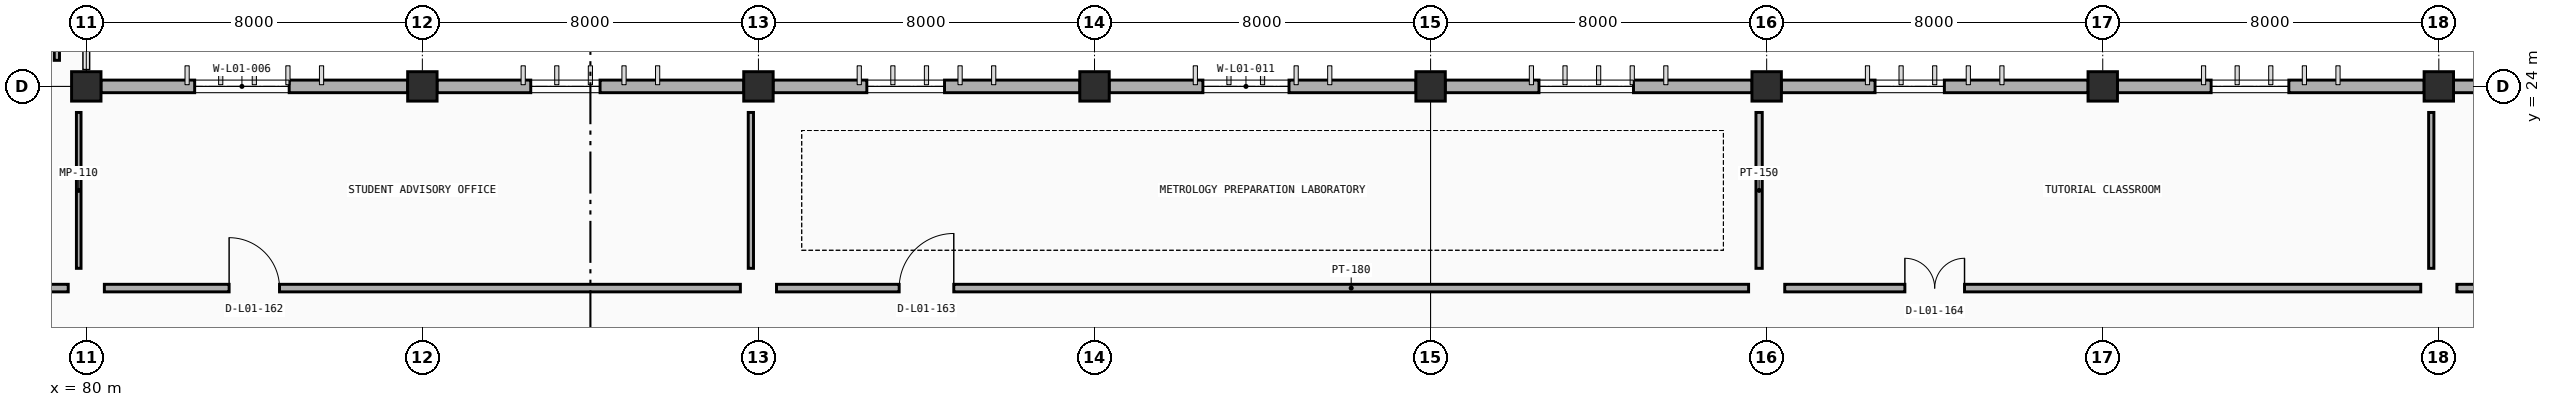
"""IFC4 building model, lengths in metres.
Left out: names, types, materials, properties, quantities, classifications, styles, units other than length and angle.
Written with IfcOpenShell. Run it as: python <this file> out.ifc"""

import sys

from ifc_helpers import new_model, si_unit, direction, frame, frame_2d, origin, origin_2d, place, context, subcontext, project, spatial, rectangle, extrude, element, fill, save


model = new_model("IFC4")
c1 = context("Model", 3, precision=1e-05, world=origin(), true_north=direction((0.0, 1.0)))
c2 = subcontext(c1, "Body", "Model", "MODEL_VIEW")
j1 = project(units=[si_unit("LENGTHUNIT", "METRE"), si_unit("PLANEANGLEUNIT", "RADIAN")], contexts=[c1])
p1 = place(None, origin())
s1 = spatial("IfcSite", under=j1, at=p1, CompositionType="ELEMENT")
p2 = place(p1, origin())
s2 = spatial("IfcBuilding", under=s1, at=p2, CompositionType="ELEMENT")
p3 = place(p2, origin())
s3 = spatial("IfcBuildingStorey", under=s2, at=p3, CompositionType="ELEMENT", Elevation=0.0)
for number, where, z_axis, x_axis in (
    (1, (80.0, 24.0, 0.0), (0.0, 0.0, 1.0), (1.0, 0.0, 0.0)),
    (2, (88.0, 24.0, 0.0), (0.0, 0.0, 1.0), (1.0, 0.0, 0.0)),
    (3, (96.0, 24.0, 0.0), (0.0, 0.0, 1.0), (1.0, 0.0, 0.0)),
    (4, (104.0, 24.0, 0.0), (0.0, 0.0, 1.0), (1.0, 0.0, 0.0)),
    (5, (112.0, 24.0, 0.0), (0.0, 0.0, 1.0), (1.0, 0.0, 0.0)),
    (6, (120.0, 24.0, 0.0), (0.0, 0.0, 1.0), (1.0, 0.0, 0.0)),
    (7, (128.0, 24.0, 0.0), (0.0, 0.0, 1.0), (1.0, 0.0, 0.0)),
    (8, (136.0, 24.0, 0.0), (0.0, 0.0, 1.0), (1.0, 0.0, 0.0)),
):
    element("IfcColumn", number, at=place(p3, frame(where, z_axis=z_axis, x_axis=x_axis)), inside=s3, PredefinedType="COLUMN", context=c2, shape_type="SweptSolid", body=[
        extrude(rectangle(XDim=0.7, YDim=0.7, at=origin_2d()), origin(), (0.0, 0.0, 1.0), 4.8),
    ])
p4 = place(p3, frame((80.347, 24.0, 0.0), z_axis=(0.0, 0.0, 1.0), x_axis=(1.0, 0.0, 0.0)))
e9 = element("IfcWall", 9, at=p4, inside=s3, PredefinedType="STANDARD", context=c2, shape_type="SweptSolid", body=[
    extrude(rectangle(XDim=7.306, YDim=0.3, at=frame_2d((3.653, 0.0))), origin(), (0.0, 0.0, 1.0), 3.91),
])
p5 = place(p4, frame((2.233, 0.0, 0.9)))
e10 = element("IfcOpeningElement", 10, at=p5, cuts=e9, PredefinedType="OPENING", context=c2, shape_type="SweptSolid", body=[
    extrude(rectangle(XDim=2.25, YDim=1.25, at=frame_2d((1.125, 0.625))), frame((0.0, 0.16, 0.0), z_axis=(0.0, -1.0, 0.0), x_axis=(1.0, 0.0, 0.0)), (0.0, 0.0, 1.0), 0.32),
])
p6 = place(p3, frame((88.347, 24.0, 0.0), z_axis=(0.0, 0.0, 1.0), x_axis=(1.0, 0.0, 0.0)))
e11 = element("IfcWall", 11, at=p6, inside=s3, PredefinedType="STANDARD", context=c2, shape_type="SweptSolid", body=[
    extrude(rectangle(XDim=7.306, YDim=0.3, at=frame_2d((3.653, 0.0))), origin(), (0.0, 0.0, 1.0), 3.91),
])
p7 = place(p6, frame((2.233, 0.0, 0.9)))
e12 = element("IfcOpeningElement", 12, at=p7, cuts=e11, PredefinedType="OPENING", context=c2, shape_type="SweptSolid", body=[
    extrude(rectangle(XDim=1.65, YDim=1.25, at=frame_2d((0.825, 0.625))), frame((0.0, 0.16, 0.0), z_axis=(0.0, -1.0, 0.0), x_axis=(1.0, 0.0, 0.0)), (0.0, 0.0, 1.0), 0.32),
])
p8 = place(p3, frame((96.347, 24.0, 0.0), z_axis=(0.0, 0.0, 1.0), x_axis=(1.0, 0.0, 0.0)))
e13 = element("IfcWall", 13, at=p8, inside=s3, PredefinedType="STANDARD", context=c2, shape_type="SweptSolid", body=[
    extrude(rectangle(XDim=7.306, YDim=0.3, at=frame_2d((3.653, 0.0))), origin(), (0.0, 0.0, 1.0), 3.91),
])
p9 = place(p8, frame((2.233, 0.0, 0.9)))
e14 = element("IfcOpeningElement", 14, at=p9, cuts=e13, PredefinedType="OPENING", context=c2, shape_type="SweptSolid", body=[
    extrude(rectangle(XDim=1.85, YDim=1.25, at=frame_2d((0.925, 0.625))), frame((0.0, 0.16, 0.0), z_axis=(0.0, -1.0, 0.0), x_axis=(1.0, 0.0, 0.0)), (0.0, 0.0, 1.0), 0.32),
])
p10 = place(p3, frame((104.347, 24.0, 0.0), z_axis=(0.0, 0.0, 1.0), x_axis=(1.0, 0.0, 0.0)))
e15 = element("IfcWall", 15, at=p10, inside=s3, PredefinedType="STANDARD", context=c2, shape_type="SweptSolid", body=[
    extrude(rectangle(XDim=7.306, YDim=0.3, at=frame_2d((3.653, 0.0))), origin(), (0.0, 0.0, 1.0), 3.91),
])
p11 = place(p10, frame((2.233, 0.0, 0.9)))
e16 = element("IfcOpeningElement", 16, at=p11, cuts=e15, PredefinedType="OPENING", context=c2, shape_type="SweptSolid", body=[
    extrude(rectangle(XDim=2.05, YDim=1.25, at=frame_2d((1.025, 0.625))), frame((0.0, 0.16, 0.0), z_axis=(0.0, -1.0, 0.0), x_axis=(1.0, 0.0, 0.0)), (0.0, 0.0, 1.0), 0.32),
])
p12 = place(p3, frame((112.347, 24.0, 0.0), z_axis=(0.0, 0.0, 1.0), x_axis=(1.0, 0.0, 0.0)))
e17 = element("IfcWall", 17, at=p12, inside=s3, PredefinedType="STANDARD", context=c2, shape_type="SweptSolid", body=[
    extrude(rectangle(XDim=7.306, YDim=0.3, at=frame_2d((3.653, 0.0))), origin(), (0.0, 0.0, 1.0), 3.91),
])
p13 = place(p12, frame((2.233, 0.0, 0.9)))
e18 = element("IfcOpeningElement", 18, at=p13, cuts=e17, PredefinedType="OPENING", context=c2, shape_type="SweptSolid", body=[
    extrude(rectangle(XDim=2.25, YDim=1.25, at=frame_2d((1.125, 0.625))), frame((0.0, 0.16, 0.0), z_axis=(0.0, -1.0, 0.0), x_axis=(1.0, 0.0, 0.0)), (0.0, 0.0, 1.0), 0.32),
])
p14 = place(p3, frame((120.347, 24.0, 0.0), z_axis=(0.0, 0.0, 1.0), x_axis=(1.0, 0.0, 0.0)))
e19 = element("IfcWall", 19, at=p14, inside=s3, PredefinedType="STANDARD", context=c2, shape_type="SweptSolid", body=[
    extrude(rectangle(XDim=7.306, YDim=0.3, at=frame_2d((3.653, 0.0))), origin(), (0.0, 0.0, 1.0), 3.91),
])
p15 = place(p14, frame((2.233, 0.0, 0.9)))
e20 = element("IfcOpeningElement", 20, at=p15, cuts=e19, PredefinedType="OPENING", context=c2, shape_type="SweptSolid", body=[
    extrude(rectangle(XDim=1.65, YDim=1.25, at=frame_2d((0.825, 0.625))), frame((0.0, 0.16, 0.0), z_axis=(0.0, -1.0, 0.0), x_axis=(1.0, 0.0, 0.0)), (0.0, 0.0, 1.0), 0.32),
])
p16 = place(p3, frame((128.347, 24.0, 0.0), z_axis=(0.0, 0.0, 1.0), x_axis=(1.0, 0.0, 0.0)))
e21 = element("IfcWall", 21, at=p16, inside=s3, PredefinedType="STANDARD", context=c2, shape_type="SweptSolid", body=[
    extrude(rectangle(XDim=7.306, YDim=0.3, at=frame_2d((3.653, 0.0))), origin(), (0.0, 0.0, 1.0), 3.91),
])
p17 = place(p16, frame((2.233, 0.0, 0.9)))
e22 = element("IfcOpeningElement", 22, at=p17, cuts=e21, PredefinedType="OPENING", context=c2, shape_type="SweptSolid", body=[
    extrude(rectangle(XDim=1.85, YDim=1.25, at=frame_2d((0.925, 0.625))), frame((0.0, 0.16, 0.0), z_axis=(0.0, -1.0, 0.0), x_axis=(1.0, 0.0, 0.0)), (0.0, 0.0, 1.0), 0.32),
])
p18 = place(p3, frame((136.347, 24.0, 0.0), z_axis=(0.0, 0.0, 1.0), x_axis=(1.0, 0.0, 0.0)))
e23 = element("IfcWall", 23, at=p18, inside=s3, PredefinedType="STANDARD", context=c2, shape_type="SweptSolid", body=[
    extrude(rectangle(XDim=7.306, YDim=0.3, at=frame_2d((3.653, 0.0))), origin(), (0.0, 0.0, 1.0), 3.91),
])
p19 = place(p18, frame((2.233, 0.0, 0.9)))
e24 = element("IfcOpeningElement", 24, at=p19, cuts=e23, PredefinedType="OPENING", context=c2, shape_type="SweptSolid", body=[
    extrude(rectangle(XDim=2.05, YDim=1.25, at=frame_2d((1.025, 0.625))), frame((0.0, 0.16, 0.0), z_axis=(0.0, -1.0, 0.0), x_axis=(1.0, 0.0, 0.0)), (0.0, 0.0, 1.0), 0.32),
])
p20 = place(p3, frame((64.43, 19.2, 0.0), z_axis=(0.0, 0.0, 1.0), x_axis=(1.0, 0.0, 0.0)))
e25 = element("IfcWall", 25, at=p20, inside=s3, PredefinedType="PARTITIONING", context=c2, shape_type="SweptSolid", body=[
    extrude(rectangle(XDim=15.14, YDim=0.18, at=frame_2d((7.57, 0.0))), origin(), (0.0, 0.0, 1.0), 3.9),
])
p21 = place(p20, frame((3.03, 0.0, 0.0)))
e26 = element("IfcOpeningElement", 26, at=p21, cuts=e25, PredefinedType="OPENING", context=c2, shape_type="SweptSolid", body=[
    extrude(rectangle(XDim=1.08, YDim=2.15, at=frame_2d((0.54, 1.075))), frame((0.0, 0.1, 0.0), z_axis=(0.0, -1.0, 0.0), x_axis=(1.0, 0.0, 0.0)), (0.0, 0.0, 1.0), 0.2),
])
p22 = place(p3, frame((79.82, 19.67, 0.0), z_axis=(0.0, 0.0, 1.0), x_axis=(0.0, 1.0, 0.0)))
e27 = element("IfcWall", 27, at=p22, inside=s3, PredefinedType="MOVABLE", context=c2, shape_type="SweptSolid", body=[
    extrude(rectangle(XDim=3.71, YDim=0.11, at=frame_2d((1.855, 0.0))), origin(), (0.0, 0.0, 1.0), 3.76),
])
p23 = place(p3, frame((80.43, 19.2, 0.0), z_axis=(0.0, 0.0, 1.0), x_axis=(1.0, 0.0, 0.0)))
e28 = element("IfcWall", 28, at=p23, inside=s3, PredefinedType="PARTITIONING", context=c2, shape_type="SweptSolid", body=[
    extrude(rectangle(XDim=15.14, YDim=0.18, at=frame_2d((7.57, 0.0))), origin(), (0.0, 0.0, 1.0), 3.9),
])
p24 = place(p23, frame((2.97, 0.0, 0.0)))
e29 = element("IfcOpeningElement", 29, at=p24, cuts=e28, PredefinedType="OPENING", context=c2, shape_type="SweptSolid", body=[
    extrude(rectangle(XDim=1.2, YDim=2.15, at=frame_2d((0.6, 1.075))), frame((0.0, 0.1, 0.0), z_axis=(0.0, -1.0, 0.0), x_axis=(1.0, 0.0, 0.0)), (0.0, 0.0, 1.0), 0.2),
])
p25 = place(p3, frame((95.82, 19.67, 0.0), z_axis=(0.0, 0.0, 1.0), x_axis=(0.0, 1.0, 0.0)))
e30 = element("IfcWall", 30, at=p25, inside=s3, PredefinedType="PARTITIONING", context=c2, shape_type="SweptSolid", body=[
    extrude(rectangle(XDim=3.71, YDim=0.125, at=frame_2d((1.855, 0.0))), origin(), (0.0, 0.0, 1.0), 3.76),
])
p26 = place(p3, frame((96.43, 19.2, 0.0), z_axis=(0.0, 0.0, 1.0), x_axis=(1.0, 0.0, 0.0)))
e31 = element("IfcWall", 31, at=p26, inside=s3, PredefinedType="PARTITIONING", context=c2, shape_type="SweptSolid", body=[
    extrude(rectangle(XDim=23.14, YDim=0.18, at=frame_2d((11.57, 0.0))), origin(), (0.0, 0.0, 1.0), 3.9),
])
p27 = place(p26, frame((2.92, 0.0, 0.0)))
e32 = element("IfcOpeningElement", 32, at=p27, cuts=e31, PredefinedType="OPENING", context=c2, shape_type="SweptSolid", body=[
    extrude(rectangle(XDim=1.3, YDim=2.18, at=frame_2d((0.65, 1.09))), frame((0.0, 0.1, 0.0), z_axis=(0.0, -1.0, 0.0), x_axis=(1.0, 0.0, 0.0)), (0.0, 0.0, 1.0), 0.2),
])
p28 = place(p3, frame((119.82, 19.67, 0.0), z_axis=(0.0, 0.0, 1.0), x_axis=(0.0, 1.0, 0.0)))
e33 = element("IfcWall", 33, at=p28, inside=s3, PredefinedType="PARTITIONING", context=c2, shape_type="SweptSolid", body=[
    extrude(rectangle(XDim=3.71, YDim=0.15, at=frame_2d((1.855, 0.0))), origin(), (0.0, 0.0, 1.0), 3.76),
])
p29 = place(p3, frame((120.43, 19.2, 0.0), z_axis=(0.0, 0.0, 1.0), x_axis=(1.0, 0.0, 0.0)))
e34 = element("IfcWall", 34, at=p29, inside=s3, PredefinedType="PARTITIONING", context=c2, shape_type="SweptSolid", body=[
    extrude(rectangle(XDim=15.14, YDim=0.18, at=frame_2d((7.57, 0.0))), origin(), (0.0, 0.0, 1.0), 3.9),
])
p30 = place(p29, frame((2.86, 0.0, 0.0)))
e35 = element("IfcOpeningElement", 35, at=p30, cuts=e34, PredefinedType="OPENING", context=c2, shape_type="SweptSolid", body=[
    extrude(rectangle(XDim=1.42, YDim=2.2, at=frame_2d((0.71, 1.1))), frame((0.0, 0.1, 0.0), z_axis=(0.0, -1.0, 0.0), x_axis=(1.0, 0.0, 0.0)), (0.0, 0.0, 1.0), 0.2),
])
p31 = place(p3, frame((135.82, 19.67, 0.0), z_axis=(0.0, 0.0, 1.0), x_axis=(0.0, 1.0, 0.0)))
e36 = element("IfcWall", 36, at=p31, inside=s3, PredefinedType="PARTITIONING", context=c2, shape_type="SweptSolid", body=[
    extrude(rectangle(XDim=3.71, YDim=0.125, at=frame_2d((1.855, 0.0))), origin(), (0.0, 0.0, 1.0), 3.76),
])
p32 = place(p3, frame((136.43, 19.2, 0.0), z_axis=(0.0, 0.0, 1.0), x_axis=(1.0, 0.0, 0.0)))
e37 = element("IfcWall", 37, at=p32, inside=s3, PredefinedType="PARTITIONING", context=c2, shape_type="SweptSolid", body=[
    extrude(rectangle(XDim=23.14, YDim=0.18, at=frame_2d((11.57, 0.0))), origin(), (0.0, 0.0, 1.0), 3.9),
])
p33 = place(p32, frame((2.79, 0.0, 0.0)))
e38 = element("IfcOpeningElement", 38, at=p33, cuts=e37, PredefinedType="OPENING", context=c2, shape_type="SweptSolid", body=[
    extrude(rectangle(XDim=1.56, YDim=2.2, at=frame_2d((0.78, 1.1))), frame((0.0, 0.1, 0.0), z_axis=(0.0, -1.0, 0.0), x_axis=(1.0, 0.0, 0.0)), (0.0, 0.0, 1.0), 0.2),
])
p34 = place(p3, frame((79.3, 24.62, 0.0), z_axis=(0.0, 0.0, 1.0), x_axis=(0.0, 1.0, 0.0)))
e39 = element("IfcWall", 39, at=p34, inside=s3, PredefinedType="PARTITIONING", context=c2, shape_type="SweptSolid", body=[
    extrude(rectangle(XDim=6.76, YDim=0.125, at=frame_2d((3.38, 0.0))), origin(), (0.0, 0.0, 1.0), 3.9),
])
p35 = place(p5, origin())
e40 = element("IfcWindow", 40, at=p35, inside=s3, PartitioningType="DOUBLE_PANEL_VERTICAL", PredefinedType="WINDOW", context=c2, shape_type="SweptSolid", body=[
    extrude(rectangle(XDim=2.25, YDim=1.25, at=frame_2d((1.125, 0.625))), frame((0.0, 0.03, 0.0), z_axis=(0.0, -1.0, 0.0), x_axis=(1.0, 0.0, 0.0)), (0.0, 0.0, 1.0), 0.06),
])
fill(e10, e40)
p36 = place(p7, origin())
e41 = element("IfcWindow", 41, at=p36, inside=s3, PartitioningType="DOUBLE_PANEL_VERTICAL", PredefinedType="WINDOW", context=c2, shape_type="SweptSolid", body=[
    extrude(rectangle(XDim=1.65, YDim=1.25, at=frame_2d((0.825, 0.625))), frame((0.0, 0.03, 0.0), z_axis=(0.0, -1.0, 0.0), x_axis=(1.0, 0.0, 0.0)), (0.0, 0.0, 1.0), 0.06),
])
fill(e12, e41)
p37 = place(p9, origin())
e42 = element("IfcWindow", 42, at=p37, inside=s3, PartitioningType="DOUBLE_PANEL_VERTICAL", PredefinedType="WINDOW", context=c2, shape_type="SweptSolid", body=[
    extrude(rectangle(XDim=1.85, YDim=1.25, at=frame_2d((0.925, 0.625))), frame((0.0, 0.03, 0.0), z_axis=(0.0, -1.0, 0.0), x_axis=(1.0, 0.0, 0.0)), (0.0, 0.0, 1.0), 0.06),
])
fill(e14, e42)
p38 = place(p11, origin())
e43 = element("IfcWindow", 43, at=p38, inside=s3, PartitioningType="DOUBLE_PANEL_VERTICAL", PredefinedType="WINDOW", context=c2, shape_type="SweptSolid", body=[
    extrude(rectangle(XDim=2.05, YDim=1.25, at=frame_2d((1.025, 0.625))), frame((0.0, 0.03, 0.0), z_axis=(0.0, -1.0, 0.0), x_axis=(1.0, 0.0, 0.0)), (0.0, 0.0, 1.0), 0.06),
])
fill(e16, e43)
p39 = place(p13, origin())
e44 = element("IfcWindow", 44, at=p39, inside=s3, PartitioningType="DOUBLE_PANEL_VERTICAL", PredefinedType="WINDOW", context=c2, shape_type="SweptSolid", body=[
    extrude(rectangle(XDim=2.25, YDim=1.25, at=frame_2d((1.125, 0.625))), frame((0.0, 0.03, 0.0), z_axis=(0.0, -1.0, 0.0), x_axis=(1.0, 0.0, 0.0)), (0.0, 0.0, 1.0), 0.06),
])
fill(e18, e44)
p40 = place(p15, origin())
e45 = element("IfcWindow", 45, at=p40, inside=s3, PartitioningType="DOUBLE_PANEL_VERTICAL", PredefinedType="WINDOW", context=c2, shape_type="SweptSolid", body=[
    extrude(rectangle(XDim=1.65, YDim=1.25, at=frame_2d((0.825, 0.625))), frame((0.0, 0.03, 0.0), z_axis=(0.0, -1.0, 0.0), x_axis=(1.0, 0.0, 0.0)), (0.0, 0.0, 1.0), 0.06),
])
fill(e20, e45)
p41 = place(p17, origin())
e46 = element("IfcWindow", 46, at=p41, inside=s3, PartitioningType="DOUBLE_PANEL_VERTICAL", PredefinedType="WINDOW", context=c2, shape_type="SweptSolid", body=[
    extrude(rectangle(XDim=1.85, YDim=1.25, at=frame_2d((0.925, 0.625))), frame((0.0, 0.03, 0.0), z_axis=(0.0, -1.0, 0.0), x_axis=(1.0, 0.0, 0.0)), (0.0, 0.0, 1.0), 0.06),
])
fill(e22, e46)
p42 = place(p24, origin())
e47 = element("IfcDoor", 47, at=p42, inside=s3, OperationType="SINGLE_SWING_LEFT", PredefinedType="DOOR", context=c2, shape_type="SweptSolid", body=[
    extrude(rectangle(XDim=1.2, YDim=2.15, at=frame_2d((0.6, 1.075))), frame((0.0, 0.025, 0.0), z_axis=(0.0, -1.0, 0.0), x_axis=(1.0, 0.0, 0.0)), (0.0, 0.0, 1.0), 0.05),
])
fill(e29, e47)
p43 = place(p27, origin())
e48 = element("IfcDoor", 48, at=p43, inside=s3, OperationType="SINGLE_SWING_RIGHT", PredefinedType="DOOR", context=c2, shape_type="SweptSolid", body=[
    extrude(rectangle(XDim=1.3, YDim=2.18, at=frame_2d((0.65, 1.09))), frame((0.0, 0.025, 0.0), z_axis=(0.0, -1.0, 0.0), x_axis=(1.0, 0.0, 0.0)), (0.0, 0.0, 1.0), 0.05),
])
fill(e32, e48)
p44 = place(p30, origin())
e49 = element("IfcDoor", 49, at=p44, inside=s3, OperationType="DOUBLE_DOOR_SINGLE_SWING", PredefinedType="DOOR", context=c2, shape_type="SweptSolid", body=[
    extrude(rectangle(XDim=1.42, YDim=2.2, at=frame_2d((0.71, 1.1))), frame((0.0, 0.025, 0.0), z_axis=(0.0, -1.0, 0.0), x_axis=(1.0, 0.0, 0.0)), (0.0, 0.0, 1.0), 0.05),
])
fill(e35, e49)
save(model, sys.argv[1])
